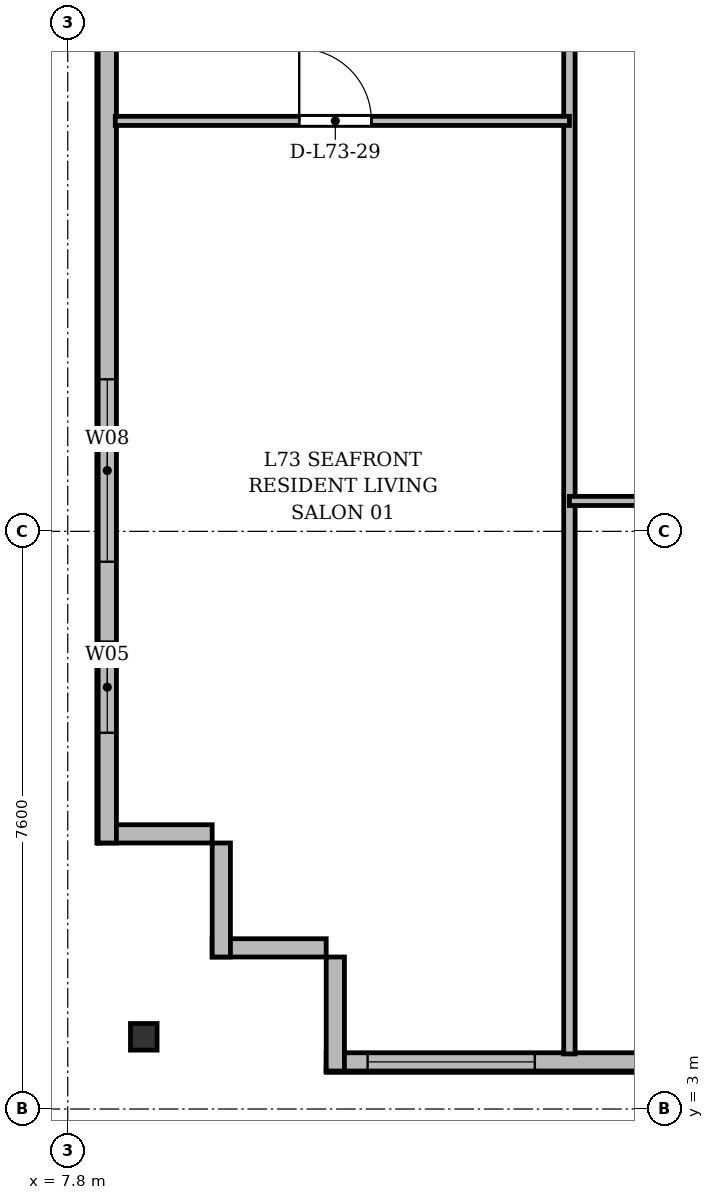
"""IFC4 building model, lengths in metres.
Left out: names, types, materials, properties, quantities, classifications, styles, units other than length and angle.
Written with IfcOpenShell. Run it as: python <this file> out.ifc"""

import sys

from ifc_helpers import new_model, si_unit, direction, frame, frame_2d, origin, origin_2d, place, context, subcontext, project, spatial, rectangle, i_section, extrude, source, transform, mapped, element, fill, save


model = new_model("IFC4")
c1 = context("Model", 3, precision=1e-05, world=origin(), true_north=direction((0.0, 1.0)))
c2 = subcontext(c1, "Body", "Model", "MODEL_VIEW")
j1 = project(units=[si_unit("LENGTHUNIT", "METRE"), si_unit("PLANEANGLEUNIT", "RADIAN")], contexts=[c1])
p1 = place(None, origin())
s1 = spatial("IfcSite", under=j1, at=p1, CompositionType="ELEMENT")
p2 = place(p1, origin())
s2 = spatial("IfcBuilding", under=s1, at=p2, CompositionType="ELEMENT")
p3 = place(p2, frame((0.0, 0.0, 281.1)))
s3 = spatial("IfcBuildingStorey", under=s2, at=p3, CompositionType="ELEMENT", Elevation=281.1)
m1 = source(origin(), c2, "Body", "SweptSolid", [
    extrude(i_section(OverallWidth=0.35, OverallDepth=0.35, WebThickness=0.018, FlangeThickness=0.028, at=origin_2d()), origin(), (0.0, 0.0, 1.0), 3.6),
])
p4 = place(p3, frame((8.8, 3.95, 0.0), z_axis=(0.0, 0.0, 1.0), x_axis=(1.0, 0.0, 0.0)))
e1 = element("IfcColumn", 1, at=p4, inside=s3, PredefinedType="COLUMN", context=c2, shape_type="MappedRepresentation", body=[
    mapped(m1, transform((0.0, 0.0, 0.0), x_axis=(1.0, 0.0, 0.0), y_axis=(0.0, 1.0, 0.0), z_axis=(0.0, 0.0, 1.0), scale=1.0)),
])
for number, where, z_axis, x_axis in (
    (2, (11.2, 5.12, 0.0), (0.0, 0.0, 1.0), (-1.0, 0.0, 0.0)),
    (3, (9.82, 5.0, 0.0), (0.0, 0.0, 1.0), (0.0, 1.0, 0.0)),
):
    element("IfcWall", number, at=place(p3, frame(where, z_axis=z_axis, x_axis=x_axis)), inside=s3, PredefinedType="SOLIDWALL", context=c2, shape_type="SweptSolid", body=[
        extrude(rectangle(XDim=1.5, YDim=0.24, at=frame_2d((0.75, 0.0))), origin(), (0.0, 0.0, 1.0), 3.37),
    ])
p5 = place(p3, frame((9.7, 6.62, 0.0), z_axis=(0.0, 0.0, 1.0), x_axis=(-1.0, 0.0, 0.0)))
e4 = element("IfcWall", 4, at=p5, inside=s3, PredefinedType="SOLIDWALL", context=c2, shape_type="SweptSolid", body=[
    extrude(rectangle(XDim=1.5, YDim=0.24, at=frame_2d((0.75, 0.0))), origin(), (0.0, 0.0, 1.0), 2.87),
])
p6 = place(p3, frame((8.32, 6.5, 0.0), z_axis=(0.0, 0.0, 1.0), x_axis=(0.0, 1.0, 0.0)))
e5 = element("IfcWall", 5, at=p6, inside=s3, PredefinedType="SOLIDWALL", context=c2, shape_type="SweptSolid", body=[
    extrude(rectangle(XDim=39.0, YDim=0.24, at=frame_2d((19.5, 0.0))), origin(), (0.0, 0.0, 1.0), 3.37),
])
p7 = place(p6, frame((1.45, 0.0, 0.92)))
e6 = element("IfcOpeningElement", 6, at=p7, cuts=e5, PredefinedType="OPENING", context=c2, shape_type="SweptSolid", body=[
    extrude(rectangle(XDim=1.2, YDim=1.65, at=frame_2d((0.6, 0.825))), frame((0.0, 0.13, 0.0), z_axis=(0.0, -1.0, 0.0), x_axis=(1.0, 0.0, 0.0)), (0.0, 0.0, 1.0), 0.26),
])
p8 = place(p6, frame((3.7, 0.0, 0.92)))
e7 = element("IfcOpeningElement", 7, at=p8, cuts=e5, PredefinedType="OPENING", context=c2, shape_type="SweptSolid", body=[
    extrude(rectangle(XDim=2.4, YDim=2.1, at=frame_2d((1.2, 1.05))), frame((0.0, 0.13, 0.0), z_axis=(0.0, -1.0, 0.0), x_axis=(1.0, 0.0, 0.0)), (0.0, 0.0, 1.0), 0.26),
])
p9 = place(p6, frame((15.1, 0.0, 0.92)))
e8 = element("IfcOpeningElement", 8, at=p9, cuts=e5, PredefinedType="OPENING", context=c2, shape_type="SweptSolid", body=[
    extrude(rectangle(XDim=2.4, YDim=2.1, at=frame_2d((1.2, 1.05))), frame((0.0, 0.13, 0.0), z_axis=(0.0, -1.0, 0.0), x_axis=(1.0, 0.0, 0.0)), (0.0, 0.0, 1.0), 0.26),
])
p10 = place(p6, frame((29.1, 0.0, 0.92)))
e9 = element("IfcOpeningElement", 9, at=p10, cuts=e5, PredefinedType="OPENING", context=c2, shape_type="SweptSolid", body=[
    extrude(rectangle(XDim=2.4, YDim=2.1, at=frame_2d((1.2, 1.05))), frame((0.0, 0.13, 0.0), z_axis=(0.0, -1.0, 0.0), x_axis=(1.0, 0.0, 0.0)), (0.0, 0.0, 1.0), 0.26),
])
p11 = place(p6, frame((36.65, 0.0, 0.92)))
e10 = element("IfcOpeningElement", 10, at=p11, cuts=e5, PredefinedType="OPENING", context=c2, shape_type="SweptSolid", body=[
    extrude(rectangle(XDim=1.2, YDim=1.65, at=frame_2d((0.6, 0.825))), frame((0.0, 0.13, 0.0), z_axis=(0.0, -1.0, 0.0), x_axis=(1.0, 0.0, 0.0)), (0.0, 0.0, 1.0), 0.26),
])
p12 = place(p3, frame((63.2, 3.62, 0.0), z_axis=(0.0, 0.0, 1.0), x_axis=(-1.0, 0.0, 0.0)))
e11 = element("IfcWall", 11, at=p12, inside=s3, PredefinedType="SOLIDWALL", context=c2, shape_type="SweptSolid", body=[
    extrude(rectangle(XDim=52.0, YDim=0.24, at=frame_2d((26.0, 0.0))), origin(), (0.0, 0.0, 1.0), 3.37),
])
p13 = place(p12, frame((0.745, 0.0, 0.9)))
e12 = element("IfcOpeningElement", 12, at=p13, cuts=e11, PredefinedType="OPENING", context=c2, shape_type="SweptSolid", body=[
    extrude(rectangle(XDim=2.0, YDim=1.95, at=frame_2d((1.0, 0.975))), frame((0.0, 0.13, 0.0), z_axis=(0.0, -1.0, 0.0), x_axis=(1.0, 0.0, 0.0)), (0.0, 0.0, 1.0), 0.26),
])
p14 = place(p12, frame((4.793, 0.0, 0.9)))
e13 = element("IfcOpeningElement", 13, at=p14, cuts=e11, PredefinedType="OPENING", context=c2, shape_type="SweptSolid", body=[
    extrude(rectangle(XDim=1.35, YDim=1.5, at=frame_2d((0.675, 0.75))), frame((0.0, 0.13, 0.0), z_axis=(0.0, -1.0, 0.0), x_axis=(1.0, 0.0, 0.0)), (0.0, 0.0, 1.0), 0.26),
])
p15 = place(p12, frame((6.685, 0.0, 0.0)))
e14 = element("IfcOpeningElement", 14, at=p15, cuts=e11, PredefinedType="OPENING", context=c2, shape_type="SweptSolid", body=[
    extrude(rectangle(XDim=1.2, YDim=2.2, at=frame_2d((0.6, 1.1))), frame((0.0, 0.13, 0.0), z_axis=(0.0, -1.0, 0.0), x_axis=(1.0, 0.0, 0.0)), (0.0, 0.0, 1.0), 0.26),
])
p16 = place(p12, frame((9.634, 0.0, 0.9)))
e15 = element("IfcOpeningElement", 15, at=p16, cuts=e11, PredefinedType="OPENING", context=c2, shape_type="SweptSolid", body=[
    extrude(rectangle(XDim=2.2, YDim=1.8, at=frame_2d((1.1, 0.9))), frame((0.0, 0.13, 0.0), z_axis=(0.0, -1.0, 0.0), x_axis=(1.0, 0.0, 0.0)), (0.0, 0.0, 1.0), 0.26),
])
p17 = place(p12, frame((13.45, 0.0, 0.9)))
e16 = element("IfcOpeningElement", 16, at=p17, cuts=e11, PredefinedType="OPENING", context=c2, shape_type="SweptSolid", body=[
    extrude(rectangle(XDim=1.5, YDim=1.75, at=frame_2d((0.75, 0.875))), frame((0.0, 0.13, 0.0), z_axis=(0.0, -1.0, 0.0), x_axis=(1.0, 0.0, 0.0)), (0.0, 0.0, 1.0), 0.26),
])
p18 = place(p12, frame((16.8, 0.0, 0.9)))
e17 = element("IfcOpeningElement", 17, at=p18, cuts=e11, PredefinedType="OPENING", context=c2, shape_type="SweptSolid", body=[
    extrude(rectangle(XDim=2.0, YDim=1.95, at=frame_2d((1.0, 0.975))), frame((0.0, 0.13, 0.0), z_axis=(0.0, -1.0, 0.0), x_axis=(1.0, 0.0, 0.0)), (0.0, 0.0, 1.0), 0.26),
])
p19 = place(p12, frame((21.375, 0.0, 0.9)))
e18 = element("IfcOpeningElement", 18, at=p19, cuts=e11, PredefinedType="OPENING", context=c2, shape_type="SweptSolid", body=[
    extrude(rectangle(XDim=1.65, YDim=1.85, at=frame_2d((0.825, 0.925))), frame((0.0, 0.13, 0.0), z_axis=(0.0, -1.0, 0.0), x_axis=(1.0, 0.0, 0.0)), (0.0, 0.0, 1.0), 0.26),
])
p20 = place(p12, frame((27.9, 0.0, 0.9)))
e19 = element("IfcOpeningElement", 19, at=p20, cuts=e11, PredefinedType="OPENING", context=c2, shape_type="SweptSolid", body=[
    extrude(rectangle(XDim=1.8, YDim=1.8, at=frame_2d((0.9, 0.9))), frame((0.0, 0.13, 0.0), z_axis=(0.0, -1.0, 0.0), x_axis=(1.0, 0.0, 0.0)), (0.0, 0.0, 1.0), 0.26),
])
p21 = place(p12, frame((33.873, 0.0, 0.0)))
e20 = element("IfcOpeningElement", 20, at=p21, cuts=e11, PredefinedType="OPENING", context=c2, shape_type="SweptSolid", body=[
    extrude(rectangle(XDim=1.2, YDim=2.2, at=frame_2d((0.6, 1.1))), frame((0.0, 0.13, 0.0), z_axis=(0.0, -1.0, 0.0), x_axis=(1.0, 0.0, 0.0)), (0.0, 0.0, 1.0), 0.26),
])
p22 = place(p12, frame((37.05, 0.0, 0.9)))
e21 = element("IfcOpeningElement", 21, at=p22, cuts=e11, PredefinedType="OPENING", context=c2, shape_type="SweptSolid", body=[
    extrude(rectangle(XDim=1.5, YDim=1.75, at=frame_2d((0.75, 0.875))), frame((0.0, 0.13, 0.0), z_axis=(0.0, -1.0, 0.0), x_axis=(1.0, 0.0, 0.0)), (0.0, 0.0, 1.0), 0.26),
])
p23 = place(p12, frame((40.3, 0.0, 0.9)))
e22 = element("IfcOpeningElement", 22, at=p23, cuts=e11, PredefinedType="OPENING", context=c2, shape_type="SweptSolid", body=[
    extrude(rectangle(XDim=2.0, YDim=1.95, at=frame_2d((1.0, 0.975))), frame((0.0, 0.13, 0.0), z_axis=(0.0, -1.0, 0.0), x_axis=(1.0, 0.0, 0.0)), (0.0, 0.0, 1.0), 0.26),
])
p24 = place(p12, frame((43.475, 0.0, 0.9)))
e23 = element("IfcOpeningElement", 23, at=p24, cuts=e11, PredefinedType="OPENING", context=c2, shape_type="SweptSolid", body=[
    extrude(rectangle(XDim=1.65, YDim=1.85, at=frame_2d((0.825, 0.925))), frame((0.0, 0.13, 0.0), z_axis=(0.0, -1.0, 0.0), x_axis=(1.0, 0.0, 0.0)), (0.0, 0.0, 1.0), 0.26),
])
p25 = place(p12, frame((45.99, 0.0, 0.9)))
e24 = element("IfcOpeningElement", 24, at=p25, cuts=e11, PredefinedType="OPENING", context=c2, shape_type="SweptSolid", body=[
    extrude(rectangle(XDim=1.2, YDim=1.65, at=frame_2d((0.6, 0.825))), frame((0.0, 0.13, 0.0), z_axis=(0.0, -1.0, 0.0), x_axis=(1.0, 0.0, 0.0)), (0.0, 0.0, 1.0), 0.26),
])
p26 = place(p12, frame((49.255, 0.0, 0.9)))
e25 = element("IfcOpeningElement", 25, at=p26, cuts=e11, PredefinedType="OPENING", context=c2, shape_type="SweptSolid", body=[
    extrude(rectangle(XDim=2.2, YDim=1.8, at=frame_2d((1.1, 0.9))), frame((0.0, 0.13, 0.0), z_axis=(0.0, -1.0, 0.0), x_axis=(1.0, 0.0, 0.0)), (0.0, 0.0, 1.0), 0.26),
])
p27 = place(p3, frame((11.32, 3.5, 0.0), z_axis=(0.0, 0.0, 1.0), x_axis=(0.0, 1.0, 0.0)))
e26 = element("IfcWall", 26, at=p27, inside=s3, PredefinedType="SOLIDWALL", context=c2, shape_type="SweptSolid", body=[
    extrude(rectangle(XDim=1.5, YDim=0.24, at=frame_2d((0.75, 0.0))), origin(), (0.0, 0.0, 1.0), 2.92),
])
p28 = place(p3, frame((14.4, 3.725, 0.0), z_axis=(0.0, 0.0, 1.0), x_axis=(0.0, 1.0, 0.0)))
e27 = element("IfcWall", 27, at=p28, inside=s3, PredefinedType="PARTITIONING", context=c2, shape_type="SweptSolid", body=[
    extrude(rectangle(XDim=27.275, YDim=0.15, at=frame_2d((13.637, 0.0))), origin(), (0.0, 0.0, 1.0), 2.92),
])
p29 = place(p3, frame((8.425, 16.0, 0.0), z_axis=(0.0, 0.0, 1.0), x_axis=(1.0, 0.0, 0.0)))
e28 = element("IfcWall", 28, at=p29, inside=s3, PredefinedType="PARTITIONING", context=c2, shape_type="SweptSolid", body=[
    extrude(rectangle(XDim=5.975, YDim=0.12, at=frame_2d((2.987, 0.0))), origin(), (0.0, 0.0, 1.0), 2.87),
])
p30 = place(p29, frame((2.42, 0.0, 0.0)))
e29 = element("IfcOpeningElement", 29, at=p30, cuts=e28, PredefinedType="OPENING", context=c2, shape_type="SweptSolid", body=[
    extrude(rectangle(XDim=0.95, YDim=2.15, at=frame_2d((0.475, 1.075))), frame((0.0, 0.07, 0.0), z_axis=(0.0, -1.0, 0.0), x_axis=(1.0, 0.0, 0.0)), (0.0, 0.0, 1.0), 0.14),
])
p31 = place(p3, frame((14.4, 11.0, 0.0), z_axis=(0.0, 0.0, 1.0), x_axis=(1.0, 0.0, 0.0)))
e30 = element("IfcWall", 30, at=p31, inside=s3, PredefinedType="PARTITIONING", context=c2, shape_type="SweptSolid", body=[
    extrude(rectangle(XDim=3.0, YDim=0.12, at=frame_2d((1.5, 0.0))), origin(), (0.0, 0.0, 1.0), 2.87),
])
p32 = place(p31, frame((1.025, 0.0, 0.0)))
e31 = element("IfcOpeningElement", 31, at=p32, cuts=e30, PredefinedType="OPENING", context=c2, shape_type="SweptSolid", body=[
    extrude(rectangle(XDim=0.95, YDim=2.15, at=frame_2d((0.475, 1.075))), frame((0.0, 0.07, 0.0), z_axis=(0.0, -1.0, 0.0), x_axis=(1.0, 0.0, 0.0)), (0.0, 0.0, 1.0), 0.14),
])
m2 = source(origin(), c2, "Body", "SweptSolid", [
    extrude(rectangle(XDim=1.2, YDim=1.65, at=frame_2d((0.6, 0.825))), frame((0.0, 0.03, 0.0), z_axis=(0.0, -1.0, 0.0), x_axis=(1.0, 0.0, 0.0)), (0.0, 0.0, 1.0), 0.06),
])
p33 = place(p7, origin())
e32 = element("IfcWindow", 32, at=p33, inside=s3, PartitioningType="SINGLE_PANEL", PredefinedType="WINDOW", context=c2, shape_type="MappedRepresentation", body=[
    mapped(m2, transform((0.0, 0.0, 0.0), x_axis=(1.0, 0.0, 0.0), y_axis=(0.0, 1.0, 0.0), z_axis=(0.0, 0.0, 1.0), scale=1.0)),
])
fill(e6, e32)
m3 = source(origin(), c2, "Body", "SweptSolid", [
    extrude(rectangle(XDim=2.4, YDim=2.1, at=frame_2d((1.2, 1.05))), frame((0.0, 0.03, 0.0), z_axis=(0.0, -1.0, 0.0), x_axis=(1.0, 0.0, 0.0)), (0.0, 0.0, 1.0), 0.06),
])
p34 = place(p8, origin())
e33 = element("IfcWindow", 33, at=p34, inside=s3, PartitioningType="SINGLE_PANEL", PredefinedType="WINDOW", context=c2, shape_type="MappedRepresentation", body=[
    mapped(m3, transform((0.0, 0.0, 0.0), x_axis=(1.0, 0.0, 0.0), y_axis=(0.0, 1.0, 0.0), z_axis=(0.0, 0.0, 1.0), scale=1.0)),
])
fill(e7, e33)
m4 = source(origin(), c2, "Body", "SweptSolid", [
    extrude(rectangle(XDim=2.2, YDim=1.8, at=frame_2d((1.1, 0.9))), frame((0.0, 0.03, 0.0), z_axis=(0.0, -1.0, 0.0), x_axis=(1.0, 0.0, 0.0)), (0.0, 0.0, 1.0), 0.06),
])
p35 = place(p26, origin())
e34 = element("IfcWindow", 34, at=p35, inside=s3, PartitioningType="SINGLE_PANEL", PredefinedType="WINDOW", context=c2, shape_type="MappedRepresentation", body=[
    mapped(m4, transform((0.0, 0.0, 0.0), x_axis=(1.0, 0.0, 0.0), y_axis=(0.0, 1.0, 0.0), z_axis=(0.0, 0.0, 1.0), scale=1.0)),
])
fill(e25, e34)
m5 = source(origin(), c2, "Body", "SweptSolid", [
    extrude(rectangle(XDim=0.95, YDim=2.15, at=frame_2d((0.475, 1.075))), frame((0.0, 0.025, 0.0), z_axis=(0.0, -1.0, 0.0), x_axis=(1.0, 0.0, 0.0)), (0.0, 0.0, 1.0), 0.05),
])
p36 = place(p30, origin())
e35 = element("IfcDoor", 35, at=p36, inside=s3, OperationType="SINGLE_SWING_LEFT", PredefinedType="DOOR", context=c2, shape_type="MappedRepresentation", body=[
    mapped(m5, transform((0.0, 0.0, 0.0), x_axis=(1.0, 0.0, 0.0), y_axis=(0.0, 1.0, 0.0), z_axis=(0.0, 0.0, 1.0), scale=1.0)),
])
fill(e29, e35)
save(model, sys.argv[1])
